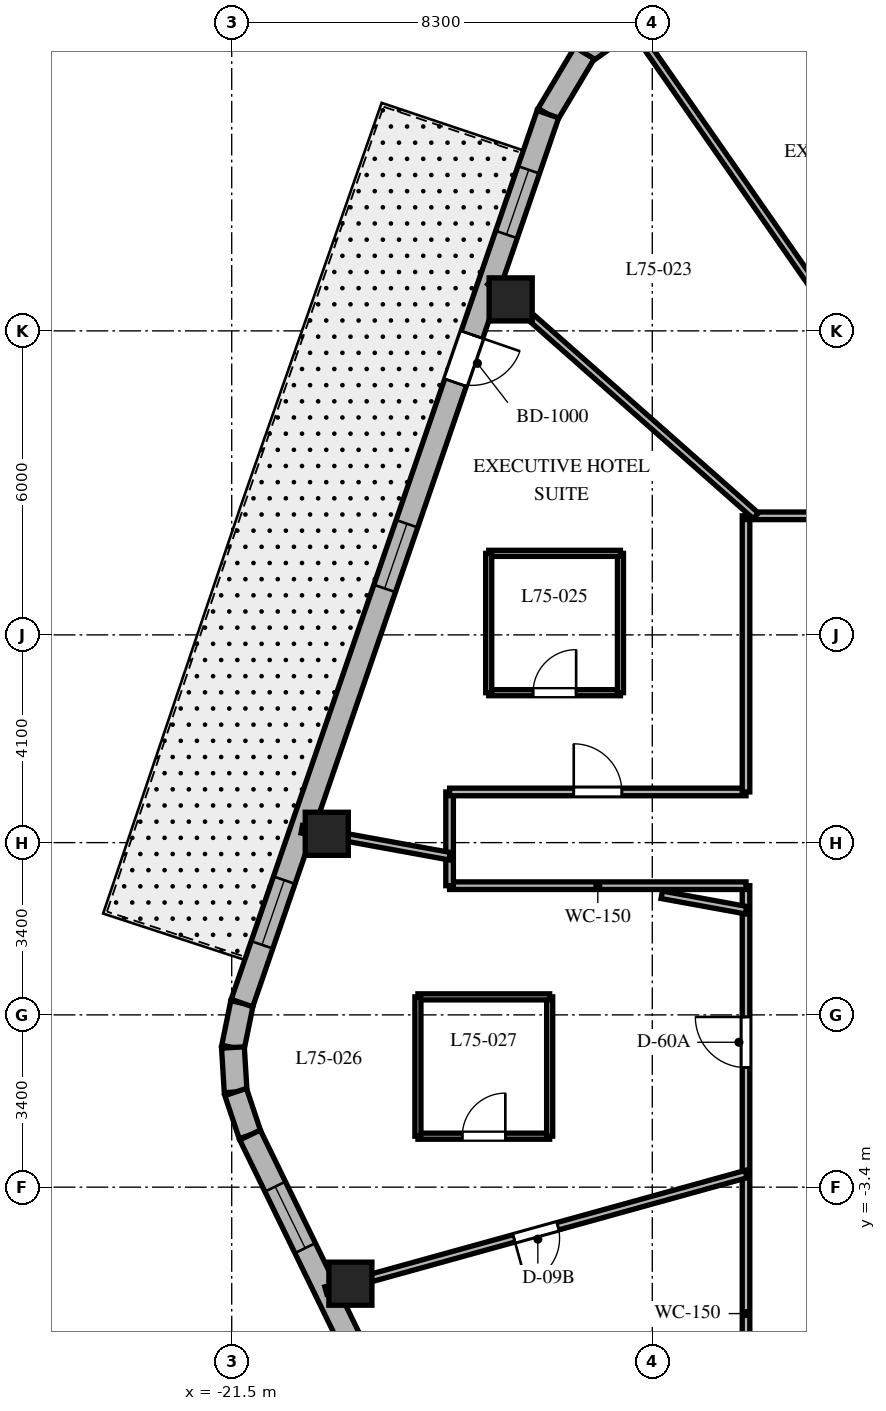
"""IFC4 building model, lengths in metres.
Left out: names, types, materials, properties, quantities, classifications, styles, units other than length and angle.
Written with IfcOpenShell. Run it as: python <this file> out.ifc"""

import sys

from ifc_helpers import new_model, si_unit, direction, frame, frame_2d, origin, origin_2d, place, context, subcontext, project, spatial, rectangle, extrude, element, fill, save


model = new_model("IFC4")
c1 = context("Model", 3, precision=1e-05, world=origin(), true_north=direction((0.0, 1.0)))
c2 = subcontext(c1, "Body", "Model", "MODEL_VIEW")
j1 = project(units=[si_unit("LENGTHUNIT", "METRE"), si_unit("PLANEANGLEUNIT", "RADIAN")], contexts=[c1])
p1 = place(None, origin())
s1 = spatial("IfcSite", under=j1, at=p1, CompositionType="ELEMENT")
p2 = place(p1, origin())
s2 = spatial("IfcBuilding", under=s1, at=p2, CompositionType="ELEMENT")
p3 = place(p2, frame((0.0, 0.0, 301.5)))
s3 = spatial("IfcBuildingStorey", under=s2, at=p3, CompositionType="ELEMENT", Elevation=301.5)
for number, where, z_axis, x_axis in (
    (1, (-15.995, 14.121, 0.0), (0.0, 0.0, 1.0), (1.0, 0.0, 0.0)),
    (2, (-19.624, 3.574, 0.0), (0.0, 0.0, 1.0), (1.0, 0.0, 0.0)),
    (3, (-19.158, -5.305, 0.0), (0.0, 0.0, 1.0), (1.0, 0.0, 0.0)),
):
    element("IfcColumn", number, at=place(p3, frame(where, z_axis=z_axis, x_axis=x_axis)), inside=s3, PredefinedType="COLUMN", context=c2, shape_type="SweptSolid", body=[
        extrude(rectangle(XDim=0.85, YDim=0.85, at=origin_2d()), origin(), (0.0, 0.0, 1.0), 3.9),
    ])
p4 = place(p3, frame((-13.415, 19.787, 0.0), z_axis=(0.0, 0.0, 1.0), x_axis=(-0.814055493997, -0.580787097561, 0.0)))
e4 = element("IfcWall", 4, at=p4, inside=s3, PredefinedType="SOLIDWALL", context=c2, shape_type="SweptSolid", body=[
    extrude(rectangle(XDim=1.383, YDim=0.45, at=frame_2d((0.691, 0.0))), origin(), (0.0, 0.0, 1.0), 3.58),
])
p5 = place(p3, frame((-14.54, 18.984, 0.0), z_axis=(0.0, 0.0, 1.0), x_axis=(-0.512374906623, -0.858761873317, 0.0)))
e5 = element("IfcWall", 5, at=p5, inside=s3, PredefinedType="SOLIDWALL", context=c2, shape_type="SweptSolid", body=[
    extrude(rectangle(XDim=1.406, YDim=0.45, at=frame_2d((0.703, 0.0))), origin(), (0.0, 0.0, 1.0), 3.58),
])
p6 = place(p3, frame((-21.298, 0.233, 0.0), z_axis=(0.0, 0.0, 1.0), x_axis=(-0.199158176661, -0.979967356941, 0.0)))
e6 = element("IfcWall", 6, at=p6, inside=s3, PredefinedType="SOLIDWALL", context=c2, shape_type="SweptSolid", body=[
    extrude(rectangle(XDim=0.895, YDim=0.45, at=frame_2d((0.447, 0.0))), origin(), (0.0, 0.0, 1.0), 3.58),
])
p7 = place(p3, frame((-21.476, -0.644, 0.0), z_axis=(0.0, 0.0, 1.0), x_axis=(0.061031097918, -0.998135865044, 0.0)))
e7 = element("IfcWall", 7, at=p7, inside=s3, PredefinedType="SOLIDWALL", context=c2, shape_type="SweptSolid", body=[
    extrude(rectangle(XDim=0.88, YDim=0.45, at=frame_2d((0.44, 0.0))), origin(), (0.0, 0.0, 1.0), 3.58),
])
p8 = place(p3, frame((-21.422, -1.522, 0.0), z_axis=(0.0, 0.0, 1.0), x_axis=(0.316964162323, -0.94843751497, 0.0)))
e8 = element("IfcWall", 8, at=p8, inside=s3, PredefinedType="SOLIDWALL", context=c2, shape_type="SweptSolid", body=[
    extrude(rectangle(XDim=0.895, YDim=0.45, at=frame_2d((0.448, 0.0))), origin(), (0.0, 0.0, 1.0), 3.58),
])
p9 = place(p3, frame((-15.26, 17.776, 0.0), z_axis=(0.0, 0.0, 1.0), x_axis=(-0.325407437101, -0.945573899745, 0.0)))
e9 = element("IfcWall", 9, at=p9, inside=s3, PredefinedType="SOLIDWALL", context=c2, shape_type="SweptSolid", body=[
    extrude(rectangle(XDim=18.552, YDim=0.45, at=frame_2d((9.276, 0.0))), origin(), (0.0, 0.0, 1.0), 3.58),
])
p10 = place(p9, frame((4.602, 0.0, 0.0)))
e10 = element("IfcOpeningElement", 10, at=p10, cuts=e9, PredefinedType="OPENING", context=c2, shape_type="SweptSolid", body=[
    extrude(rectangle(XDim=1.0, YDim=2.15, at=frame_2d((0.5, 1.075))), frame((0.0, 0.235, 0.0), z_axis=(0.0, -1.0, 0.0), x_axis=(1.0, 0.0, 0.0)), (0.0, 0.0, 1.0), 0.47),
])
p11 = place(p9, frame((1.161, 0.0, 0.8)))
e11 = element("IfcOpeningElement", 11, at=p11, cuts=e9, PredefinedType="OPENING", context=c2, shape_type="SweptSolid", body=[
    extrude(rectangle(XDim=1.35, YDim=1.75, at=frame_2d((0.675, 0.875))), frame((0.0, 0.235, 0.0), z_axis=(0.0, -1.0, 0.0), x_axis=(1.0, 0.0, 0.0)), (0.0, 0.0, 1.0), 0.47),
])
p12 = place(p9, frame((8.548, 0.0, 0.8)))
e12 = element("IfcOpeningElement", 12, at=p12, cuts=e9, PredefinedType="OPENING", context=c2, shape_type="SweptSolid", body=[
    extrude(rectangle(XDim=1.35, YDim=1.75, at=frame_2d((0.675, 0.875))), frame((0.0, 0.235, 0.0), z_axis=(0.0, -1.0, 0.0), x_axis=(1.0, 0.0, 0.0)), (0.0, 0.0, 1.0), 0.47),
])
p13 = place(p9, frame((15.987, 0.0, 0.8)))
e13 = element("IfcOpeningElement", 13, at=p13, cuts=e9, PredefinedType="OPENING", context=c2, shape_type="SweptSolid", body=[
    extrude(rectangle(XDim=1.35, YDim=1.75, at=frame_2d((0.675, 0.875))), frame((0.0, 0.235, 0.0), z_axis=(0.0, -1.0, 0.0), x_axis=(1.0, 0.0, 0.0)), (0.0, 0.0, 1.0), 0.47),
])
p14 = place(p3, frame((-21.138, -2.371, 0.0), z_axis=(0.0, 0.0, 1.0), x_axis=(0.438128124058, -0.89891253574, 0.0)))
e14 = element("IfcWall", 14, at=p14, inside=s3, PredefinedType="SOLIDWALL", context=c2, shape_type="SweptSolid", body=[
    extrude(rectangle(XDim=17.565, YDim=0.45, at=frame_2d((8.782, 0.0))), origin(), (0.0, 0.0, 1.0), 3.58),
])
p15 = place(p14, frame((1.133, 0.0, 0.8)))
e15 = element("IfcOpeningElement", 15, at=p15, cuts=e14, PredefinedType="OPENING", context=c2, shape_type="SweptSolid", body=[
    extrude(rectangle(XDim=1.35, YDim=1.75, at=frame_2d((0.675, 0.875))), frame((0.0, 0.235, 0.0), z_axis=(0.0, -1.0, 0.0), x_axis=(1.0, 0.0, 0.0)), (0.0, 0.0, 1.0), 0.47),
])
p16 = place(p14, frame((8.158, 0.0, 0.8)))
e16 = element("IfcOpeningElement", 16, at=p16, cuts=e14, PredefinedType="OPENING", context=c2, shape_type="SweptSolid", body=[
    extrude(rectangle(XDim=1.35, YDim=1.75, at=frame_2d((0.675, 0.875))), frame((0.0, 0.235, 0.0), z_axis=(0.0, -1.0, 0.0), x_axis=(1.0, 0.0, 0.0)), (0.0, 0.0, 1.0), 0.47),
])
p17 = place(p14, frame((15.132, 0.0, 0.8)))
e17 = element("IfcOpeningElement", 17, at=p17, cuts=e14, PredefinedType="OPENING", context=c2, shape_type="SweptSolid", body=[
    extrude(rectangle(XDim=1.35, YDim=1.75, at=frame_2d((0.675, 0.875))), frame((0.0, 0.235, 0.0), z_axis=(0.0, -1.0, 0.0), x_axis=(1.0, 0.0, 0.0)), (0.0, 0.0, 1.0), 0.47),
])
p18 = place(p3, frame((-11.35, -9.85, 0.0), z_axis=(0.0, 0.0, 1.0), x_axis=(0.0, 1.0, 0.0)))
e18 = element("IfcWall", 18, at=p18, inside=s3, PredefinedType="PARTITIONING", context=c2, shape_type="SweptSolid", body=[
    extrude(rectangle(XDim=12.4, YDim=0.15, at=frame_2d((6.2, 0.0))), origin(), (0.0, 0.0, 1.0), 2.17),
])
p19 = place(p18, frame((8.81, 0.0, 0.0)))
e19 = element("IfcOpeningElement", 19, at=p19, cuts=e18, PredefinedType="OPENING", context=c2, shape_type="SweptSolid", body=[
    extrude(rectangle(XDim=1.0, YDim=2.03, at=frame_2d((0.5, 1.015))), frame((0.0, 0.085, 0.0), z_axis=(0.0, -1.0, 0.0), x_axis=(1.0, 0.0, 0.0)), (0.0, 0.0, 1.0), 0.17),
])
p20 = place(p3, frame((-11.35, 2.55, 0.0), z_axis=(0.0, 0.0, 1.0), x_axis=(-1.0, 0.0, 0.0)))
e20 = element("IfcWall", 20, at=p20, inside=s3, PredefinedType="PARTITIONING", context=c2, shape_type="SweptSolid", body=[
    extrude(rectangle(XDim=5.85, YDim=0.15, at=frame_2d((2.925, 0.0))), origin(), (0.0, 0.0, 1.0), 2.17),
])
p21 = place(p3, frame((-17.2, 2.55, 0.0), z_axis=(0.0, 0.0, 1.0), x_axis=(0.0, 1.0, 0.0)))
e21 = element("IfcWall", 21, at=p21, inside=s3, PredefinedType="PARTITIONING", context=c2, shape_type="SweptSolid", body=[
    extrude(rectangle(XDim=1.85, YDim=0.15, at=frame_2d((0.925, 0.0))), origin(), (0.0, 0.0, 1.0), 2.17),
])
p22 = place(p3, frame((-17.2, 4.4, 0.0), z_axis=(0.0, 0.0, 1.0), x_axis=(1.0, 0.0, 0.0)))
e22 = element("IfcWall", 22, at=p22, inside=s3, PredefinedType="PARTITIONING", context=c2, shape_type="SweptSolid", body=[
    extrude(rectangle(XDim=5.85, YDim=0.15, at=frame_2d((2.925, 0.0))), origin(), (0.0, 0.0, 1.0), 2.17),
])
p23 = place(p22, frame((2.45, 0.0, 0.0)))
e23 = element("IfcOpeningElement", 23, at=p23, cuts=e22, PredefinedType="OPENING", context=c2, shape_type="SweptSolid", body=[
    extrude(rectangle(XDim=0.95, YDim=2.03, at=frame_2d((0.475, 1.015))), frame((0.0, 0.085, 0.0), z_axis=(0.0, -1.0, 0.0), x_axis=(1.0, 0.0, 0.0)), (0.0, 0.0, 1.0), 0.17),
])
p24 = place(p3, frame((-11.35, 4.4, 0.0), z_axis=(0.0, 0.0, 1.0), x_axis=(0.0, 1.0, 0.0)))
e24 = element("IfcWall", 24, at=p24, inside=s3, PredefinedType="PARTITIONING", context=c2, shape_type="SweptSolid", body=[
    extrude(rectangle(XDim=5.45, YDim=0.15, at=frame_2d((2.725, 0.0))), origin(), (0.0, 0.0, 1.0), 2.17),
])
p25 = place(p3, frame((-11.35, 9.85, 0.0), z_axis=(0.0, 0.0, 1.0), x_axis=(1.0, 0.0, 0.0)))
e25 = element("IfcWall", 25, at=p25, inside=s3, PredefinedType="PARTITIONING", context=c2, shape_type="SweptSolid", body=[
    extrude(rectangle(XDim=10.43, YDim=0.15, at=frame_2d((5.215, 0.0))), origin(), (0.0, 0.0, 1.0), 2.17),
])
p26 = place(p25, frame((8.407, 0.0, 0.0)))
e26 = element("IfcOpeningElement", 26, at=p26, cuts=e25, PredefinedType="OPENING", context=c2, shape_type="SweptSolid", body=[
    extrude(rectangle(XDim=0.9, YDim=2.03, at=frame_2d((0.45, 1.015))), frame((0.0, 0.085, 0.0), z_axis=(0.0, -1.0, 0.0), x_axis=(1.0, 0.0, 0.0)), (0.0, 0.0, 1.0), 0.17),
])
p27 = place(p25, frame((5.541, 0.0, 0.0)))
e27 = element("IfcOpeningElement", 27, at=p27, cuts=e25, PredefinedType="OPENING", context=c2, shape_type="SweptSolid", body=[
    extrude(rectangle(XDim=0.9, YDim=2.03, at=frame_2d((0.45, 1.015))), frame((0.0, 0.085, 0.0), z_axis=(0.0, -1.0, 0.0), x_axis=(1.0, 0.0, 0.0)), (0.0, 0.0, 1.0), 0.17),
])
p28 = place(p25, frame((1.916, 0.0, 0.0)))
e28 = element("IfcOpeningElement", 28, at=p28, cuts=e25, PredefinedType="OPENING", context=c2, shape_type="SweptSolid", body=[
    extrude(rectangle(XDim=0.9, YDim=2.03, at=frame_2d((0.45, 1.015))), frame((0.0, 0.085, 0.0), z_axis=(0.0, -1.0, 0.0), x_axis=(1.0, 0.0, 0.0)), (0.0, 0.0, 1.0), 0.17),
])
p29 = place(p3, frame((-6.858, 9.85, 0.0), z_axis=(0.0, 0.0, 1.0), x_axis=(-0.571391702066, 0.820677477948, 0.0)))
e29 = element("IfcWall", 29, at=p29, inside=s3, PredefinedType="PARTITIONING", context=c2, shape_type="SweptSolid", body=[
    extrude(rectangle(XDim=11.738, YDim=0.15, at=frame_2d((5.869, 0.0))), origin(), (0.0, 0.0, 1.0), 2.17),
])
p30 = place(p3, frame((-11.157, 9.85, 0.0), z_axis=(0.0, 0.0, 1.0), x_axis=(-0.74966962095, 0.661812253909, 0.0)))
e30 = element("IfcWall", 30, at=p30, inside=s3, PredefinedType="PARTITIONING", context=c2, shape_type="SweptSolid", body=[
    extrude(rectangle(XDim=6.989, YDim=0.15, at=frame_2d((3.494, 0.0))), origin(), (0.0, 0.0, 1.0), 2.17),
])
p31 = place(p3, frame((-11.35, 2.067, 0.0), z_axis=(0.0, 0.0, 1.0), x_axis=(-0.983807459651, 0.179228575665, 0.0)))
e31 = element("IfcWall", 31, at=p31, inside=s3, PredefinedType="PARTITIONING", context=c2, shape_type="SweptSolid", body=[
    extrude(rectangle(XDim=1.69, YDim=0.15, at=frame_2d((0.845, 0.0))), origin(), (0.0, 0.0, 1.0), 3.58),
])
p32 = place(p3, frame((-17.2, 3.133, 0.0), z_axis=(0.0, 0.0, 1.0), x_axis=(-0.983817168797, 0.179175272791, 0.0)))
e32 = element("IfcWall", 32, at=p32, inside=s3, PredefinedType="PARTITIONING", context=c2, shape_type="SweptSolid", body=[
    extrude(rectangle(XDim=2.965, YDim=0.15, at=frame_2d((1.482, 0.0))), origin(), (0.0, 0.0, 1.0), 2.17),
])
p33 = place(p3, frame((-11.35, -3.143, 0.0), z_axis=(0.0, 0.0, 1.0), x_axis=(-0.963731818141, -0.266872596386, 0.0)))
e33 = element("IfcWall", 33, at=p33, inside=s3, PredefinedType="PARTITIONING", context=c2, shape_type="SweptSolid", body=[
    extrude(rectangle(XDim=8.605, YDim=0.15, at=frame_2d((4.302, 0.0))), origin(), (0.0, 0.0, 1.0), 2.17),
])
p34 = place(p33, frame((3.852, 0.0, 0.0)))
e34 = element("IfcOpeningElement", 34, at=p34, cuts=e33, PredefinedType="OPENING", context=c2, shape_type="SweptSolid", body=[
    extrude(rectangle(XDim=0.9, YDim=2.03, at=frame_2d((0.45, 1.015))), frame((0.0, 0.085, 0.0), z_axis=(0.0, -1.0, 0.0), x_axis=(1.0, 0.0, 0.0)), (0.0, 0.0, 1.0), 0.17),
])
p35 = place(p3, frame((-16.428, 6.359, 0.0), z_axis=(0.0, 0.0, 1.0), x_axis=(1.0, 0.0, 0.0)))
e35 = element("IfcWall", 35, at=p35, inside=s3, PredefinedType="PARTITIONING", context=c2, shape_type="SweptSolid", body=[
    extrude(rectangle(XDim=2.6, YDim=0.12, at=frame_2d((1.3, 0.0))), origin(), (0.0, 0.0, 1.0), 3.152),
])
p36 = place(p35, frame((0.875, 0.0, 0.0)))
e36 = element("IfcOpeningElement", 36, at=p36, cuts=e35, PredefinedType="OPENING", context=c2, shape_type="SweptSolid", body=[
    extrude(rectangle(XDim=0.85, YDim=2.03, at=frame_2d((0.425, 1.015))), frame((0.0, 0.07, 0.0), z_axis=(0.0, -1.0, 0.0), x_axis=(1.0, 0.0, 0.0)), (0.0, 0.0, 1.0), 0.14),
])
p37 = place(p3, frame((-13.828, 6.359, 0.0), z_axis=(0.0, 0.0, 1.0), x_axis=(0.0, 1.0, 0.0)))
e37 = element("IfcWall", 37, at=p37, inside=s3, PredefinedType="PARTITIONING", context=c2, shape_type="SweptSolid", body=[
    extrude(rectangle(XDim=2.75, YDim=0.12, at=frame_2d((1.375, 0.0))), origin(), (0.0, 0.0, 1.0), 3.58),
])
p38 = place(p3, frame((-13.828, 9.109, 0.0), z_axis=(0.0, 0.0, 1.0), x_axis=(-1.0, 0.0, 0.0)))
e38 = element("IfcWall", 38, at=p38, inside=s3, PredefinedType="PARTITIONING", context=c2, shape_type="SweptSolid", body=[
    extrude(rectangle(XDim=2.6, YDim=0.12, at=frame_2d((1.3, 0.0))), origin(), (0.0, 0.0, 1.0), 3.152),
])
p39 = place(p3, frame((-16.428, 9.109, 0.0), z_axis=(0.0, 0.0, 1.0), x_axis=(0.0, -1.0, 0.0)))
e39 = element("IfcWall", 39, at=p39, inside=s3, PredefinedType="PARTITIONING", context=c2, shape_type="SweptSolid", body=[
    extrude(rectangle(XDim=2.75, YDim=0.12, at=frame_2d((1.375, 0.0))), origin(), (0.0, 0.0, 1.0), 3.58),
])
p40 = place(p3, frame((-17.825, -2.394, 0.0), z_axis=(0.0, 0.0, 1.0), x_axis=(1.0, 0.0, 0.0)))
e40 = element("IfcWall", 40, at=p40, inside=s3, PredefinedType="PARTITIONING", context=c2, shape_type="SweptSolid", body=[
    extrude(rectangle(XDim=2.6, YDim=0.12, at=frame_2d((1.3, 0.0))), origin(), (0.0, 0.0, 1.0), 3.021),
])
p41 = place(p40, frame((0.875, 0.0, 0.0)))
e41 = element("IfcOpeningElement", 41, at=p41, cuts=e40, PredefinedType="OPENING", context=c2, shape_type="SweptSolid", body=[
    extrude(rectangle(XDim=0.85, YDim=2.03, at=frame_2d((0.425, 1.015))), frame((0.0, 0.07, 0.0), z_axis=(0.0, -1.0, 0.0), x_axis=(1.0, 0.0, 0.0)), (0.0, 0.0, 1.0), 0.14),
])
p42 = place(p3, frame((-15.225, -2.394, 0.0), z_axis=(0.0, 0.0, 1.0), x_axis=(0.0, 1.0, 0.0)))
e42 = element("IfcWall", 42, at=p42, inside=s3, PredefinedType="PARTITIONING", context=c2, shape_type="SweptSolid", body=[
    extrude(rectangle(XDim=2.75, YDim=0.12, at=frame_2d((1.375, 0.0))), origin(), (0.0, 0.0, 1.0), 3.58),
])
p43 = place(p3, frame((-15.225, 0.356, 0.0), z_axis=(0.0, 0.0, 1.0), x_axis=(-1.0, 0.0, 0.0)))
e43 = element("IfcWall", 43, at=p43, inside=s3, PredefinedType="PARTITIONING", context=c2, shape_type="SweptSolid", body=[
    extrude(rectangle(XDim=2.6, YDim=0.12, at=frame_2d((1.3, 0.0))), origin(), (0.0, 0.0, 1.0), 3.021),
])
p44 = place(p3, frame((-17.825, 0.356, 0.0), z_axis=(0.0, 0.0, 1.0), x_axis=(0.0, -1.0, 0.0)))
e44 = element("IfcWall", 44, at=p44, inside=s3, PredefinedType="PARTITIONING", context=c2, shape_type="SweptSolid", body=[
    extrude(rectangle(XDim=2.75, YDim=0.12, at=frame_2d((1.375, 0.0))), origin(), (0.0, 0.0, 1.0), 3.58),
])
p45 = place(p10, origin())
e45 = element("IfcDoor", 45, at=p45, inside=s3, OperationType="SINGLE_SWING_LEFT", PredefinedType="DOOR", context=c2, shape_type="SweptSolid", body=[
    extrude(rectangle(XDim=1.0, YDim=2.15, at=frame_2d((0.5, 1.075))), frame((0.0, 0.025, 0.0), z_axis=(0.0, -1.0, 0.0), x_axis=(1.0, 0.0, 0.0)), (0.0, 0.0, 1.0), 0.05),
])
fill(e10, e45)
p46 = place(p11, origin())
e46 = element("IfcWindow", 46, at=p46, inside=s3, PartitioningType="SINGLE_PANEL", PredefinedType="WINDOW", context=c2, shape_type="SweptSolid", body=[
    extrude(rectangle(XDim=1.35, YDim=1.75, at=frame_2d((0.675, 0.875))), frame((0.0, 0.03, 0.0), z_axis=(0.0, -1.0, 0.0), x_axis=(1.0, 0.0, 0.0)), (0.0, 0.0, 1.0), 0.06),
])
fill(e11, e46)
p47 = place(p12, origin())
e47 = element("IfcWindow", 47, at=p47, inside=s3, PartitioningType="SINGLE_PANEL", PredefinedType="WINDOW", context=c2, shape_type="SweptSolid", body=[
    extrude(rectangle(XDim=1.35, YDim=1.75, at=frame_2d((0.675, 0.875))), frame((0.0, 0.03, 0.0), z_axis=(0.0, -1.0, 0.0), x_axis=(1.0, 0.0, 0.0)), (0.0, 0.0, 1.0), 0.06),
])
fill(e12, e47)
p48 = place(p13, origin())
e48 = element("IfcWindow", 48, at=p48, inside=s3, PartitioningType="SINGLE_PANEL", PredefinedType="WINDOW", context=c2, shape_type="SweptSolid", body=[
    extrude(rectangle(XDim=1.35, YDim=1.75, at=frame_2d((0.675, 0.875))), frame((0.0, 0.03, 0.0), z_axis=(0.0, -1.0, 0.0), x_axis=(1.0, 0.0, 0.0)), (0.0, 0.0, 1.0), 0.06),
])
fill(e13, e48)
p49 = place(p15, origin())
e49 = element("IfcWindow", 49, at=p49, inside=s3, PartitioningType="SINGLE_PANEL", PredefinedType="WINDOW", context=c2, shape_type="SweptSolid", body=[
    extrude(rectangle(XDim=1.35, YDim=1.75, at=frame_2d((0.675, 0.875))), frame((0.0, 0.03, 0.0), z_axis=(0.0, -1.0, 0.0), x_axis=(1.0, 0.0, 0.0)), (0.0, 0.0, 1.0), 0.06),
])
fill(e15, e49)
p50 = place(p23, origin())
e50 = element("IfcDoor", 50, at=p50, inside=s3, OperationType="SINGLE_SWING_LEFT", PredefinedType="DOOR", context=c2, shape_type="SweptSolid", body=[
    extrude(rectangle(XDim=0.95, YDim=2.03, at=frame_2d((0.475, 1.015))), frame((0.0, 0.025, 0.0), z_axis=(0.0, -1.0, 0.0), x_axis=(1.0, 0.0, 0.0)), (0.0, 0.0, 1.0), 0.05),
])
fill(e23, e50)
p51 = place(p36, origin())
e51 = element("IfcDoor", 51, at=p51, inside=s3, OperationType="SINGLE_SWING_RIGHT", PredefinedType="DOOR", context=c2, shape_type="SweptSolid", body=[
    extrude(rectangle(XDim=0.85, YDim=2.03, at=frame_2d((0.425, 1.015))), frame((0.0, 0.025, 0.0), z_axis=(0.0, -1.0, 0.0), x_axis=(1.0, 0.0, 0.0)), (0.0, 0.0, 1.0), 0.05),
])
fill(e36, e51)
p52 = place(p19, origin())
e52 = element("IfcDoor", 52, at=p52, inside=s3, OperationType="SINGLE_SWING_RIGHT", PredefinedType="DOOR", context=c2, shape_type="SweptSolid", body=[
    extrude(rectangle(XDim=1.0, YDim=2.03, at=frame_2d((0.5, 1.015))), frame((0.0, 0.025, 0.0), z_axis=(0.0, -1.0, 0.0), x_axis=(1.0, 0.0, 0.0)), (0.0, 0.0, 1.0), 0.05),
])
fill(e19, e52)
p53 = place(p34, origin())
e53 = element("IfcDoor", 53, at=p53, inside=s3, OperationType="SINGLE_SWING_RIGHT", PredefinedType="DOOR", context=c2, shape_type="SweptSolid", body=[
    extrude(rectangle(XDim=0.9, YDim=2.03, at=frame_2d((0.45, 1.015))), frame((0.0, 0.025, 0.0), z_axis=(0.0, -1.0, 0.0), x_axis=(1.0, 0.0, 0.0)), (0.0, 0.0, 1.0), 0.05),
])
fill(e34, e53)
p54 = place(p41, origin())
e54 = element("IfcDoor", 54, at=p54, inside=s3, OperationType="SINGLE_SWING_RIGHT", PredefinedType="DOOR", context=c2, shape_type="SweptSolid", body=[
    extrude(rectangle(XDim=0.85, YDim=2.03, at=frame_2d((0.425, 1.015))), frame((0.0, 0.025, 0.0), z_axis=(0.0, -1.0, 0.0), x_axis=(1.0, 0.0, 0.0)), (0.0, 0.0, 1.0), 0.05),
])
fill(e41, e54)
save(model, sys.argv[1])
